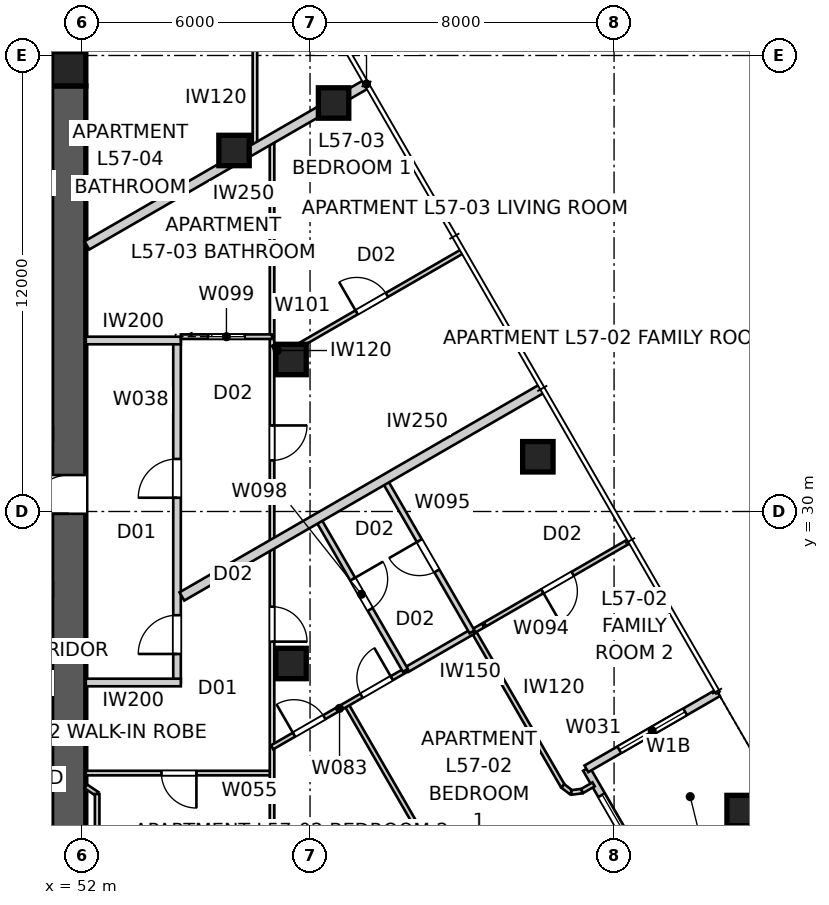
"""IFC4 building model, lengths in metres.
Left out: names, types, materials, properties, quantities, classifications, styles, units other than length and angle.
Written with IfcOpenShell. Run it as: python <this file> out.ifc"""

import sys

from ifc_helpers import new_model, si_unit, direction, frame, frame_2d, origin, origin_2d, place, context, subcontext, project, spatial, polyline, rectangle, outline, extrude, element, fill, save


model = new_model("IFC4")
c1 = context("Model", 3, precision=1e-05, world=origin(), true_north=direction((0.0, 1.0)))
c2 = subcontext(c1, "Body", "Model", "MODEL_VIEW")
j1 = project(units=[si_unit("LENGTHUNIT", "METRE"), si_unit("PLANEANGLEUNIT", "RADIAN")], contexts=[c1])
p1 = place(None, origin())
s1 = spatial("IfcSite", under=j1, at=p1, CompositionType="ELEMENT")
p2 = place(p1, origin())
s2 = spatial("IfcBuilding", under=s1, at=p2, CompositionType="ELEMENT")
p3 = place(p2, frame((0.0, 0.0, 208.2)))
s3 = spatial("IfcBuildingStorey", under=s2, at=p3, CompositionType="ELEMENT", Elevation=208.2)
p4 = place(p3, frame((28.8, 41.65, 0.0), z_axis=(0.0, 0.0, 1.0), x_axis=(1.0, 0.0, 0.0)))
e1 = element("IfcWall", 1, at=p4, inside=s3, PredefinedType="SHEAR", context=c2, shape_type="SweptSolid", body=[
    extrude(outline(polyline([(0.0, -0.45), (22.4, -0.45), (22.4, -0.025), (22.85, -0.025), (22.85, 0.025), (22.4, 0.025), (22.4, 0.45), (0.0, 0.45), (0.0, 0.025), (-0.45, 0.025), (-0.45, -0.025), (0.0, -0.025), (0.0, -0.45)])), origin(), (0.0, 0.0, 1.0), 3.4),
])
p5 = place(p3, frame((51.65, 18.8, 0.0), z_axis=(0.0, 0.0, 1.0), x_axis=(0.0, 1.0, 0.0)))
e2 = element("IfcWall", 2, at=p5, inside=s3, PredefinedType="SHEAR", context=c2, shape_type="SweptSolid", body=[
    extrude(outline(polyline([(0.0, -0.45), (22.4, -0.45), (22.4, -0.025), (22.85, -0.025), (22.85, 0.025), (22.4, 0.025), (22.4, 0.45), (0.0, 0.45), (0.0, 0.025), (-0.45, 0.025), (-0.45, -0.025), (0.0, -0.025), (0.0, -0.45)])), origin(), (0.0, 0.0, 1.0), 3.4),
])
p6 = place(p5, frame((11.14, 0.0, 0.0)))
e3 = element("IfcOpeningElement", 3, at=p6, cuts=e2, PredefinedType="OPENING", context=c2, shape_type="SweptSolid", body=[
    extrude(rectangle(XDim=1.02, YDim=2.4, at=frame_2d((0.51, 1.2))), frame((0.0, 0.46, 0.0), z_axis=(0.0, -1.0, 0.0), x_axis=(1.0, 0.0, 0.0)), (0.0, 0.0, 1.0), 0.92),
])
p7 = place(p3, frame((51.65, 41.65, 0.0), z_axis=(0.0, 0.0, 1.0), x_axis=(1.0, 0.0, 0.0)))
e4 = element("IfcColumn", 4, at=p7, inside=s3, PredefinedType="COLUMN", context=c2, shape_type="SweptSolid", body=[
    extrude(rectangle(XDim=0.9, YDim=0.9, at=origin_2d()), origin(), (0.0, 0.0, 1.0), 3.4),
])
for number, where, z_axis, x_axis in (
    (5, (69.37, 22.13, -0.15), (0.0, 0.0, 1.0), (1.0, 0.0, 0.0)),
    (6, (63.995, 31.44, -0.15), (0.0, 0.0, 1.0), (1.0, 0.0, 0.0)),
    (7, (58.62, 40.75, -0.15), (0.0, 0.0, 1.0), (1.0, 0.0, 0.0)),
):
    element("IfcColumn", number, at=place(p3, frame(where, z_axis=z_axis, x_axis=x_axis)), inside=s3, PredefinedType="COLUMN", context=c2, shape_type="SweptSolid", body=[
        extrude(rectangle(XDim=0.8, YDim=0.8, at=origin_2d()), origin(), (0.0, 0.0, 1.0), 3.55),
    ])
for number, where, z_axis, x_axis in (
    (8, (57.5, 26.0, 0.0), (0.0, 0.0, 1.0), (1.0, 0.0, 0.0)),
    (9, (57.5, 34.0, 0.0), (0.0, 0.0, 1.0), (1.0, 0.0, 0.0)),
    (10, (56.0, 39.5, 0.0), (0.0, 0.0, 1.0), (1.0, 0.0, 0.0)),
):
    element("IfcColumn", number, at=place(p3, frame(where, z_axis=z_axis, x_axis=x_axis)), inside=s3, PredefinedType="COLUMN", context=c2, shape_type="SweptSolid", body=[
        extrude(rectangle(XDim=0.8, YDim=0.8, at=origin_2d()), origin(), (0.0, 0.0, 1.0), 3.4),
    ])
p8 = place(p3, frame((67.271, 19.764, 0.0), z_axis=(0.0, 0.0, 1.0), x_axis=(-0.49999894854, 0.866026010844, 0.0)))
e11 = element("IfcWall", 11, at=p8, inside=s3, PredefinedType="SOLIDWALL", context=c2, shape_type="SweptSolid", body=[
    extrude(rectangle(XDim=4.0, YDim=0.2, at=frame_2d((2.0, 0.0))), origin(), (0.0, 0.0, 1.0), 3.25),
])
p9 = place(p8, frame((0.8, 0.0, 0.0)))
e12 = element("IfcOpeningElement", 12, at=p9, cuts=e11, PredefinedType="OPENING", context=c2, shape_type="SweptSolid", body=[
    extrude(rectangle(XDim=2.4, YDim=2.1, at=frame_2d((1.2, 1.05))), frame((0.0, 0.11, 0.0), z_axis=(0.0, -1.0, 0.0), x_axis=(1.0, 0.0, 0.0)), (0.0, 0.0, 1.0), 0.22),
])
p10 = place(p3, frame((65.271, 23.229, 0.0), z_axis=(0.0, 0.0, 1.0), x_axis=(0.866026010844, 0.49999894854, 0.0)))
e13 = element("IfcWall", 13, at=p10, inside=s3, PredefinedType="SOLIDWALL", context=c2, shape_type="SweptSolid", body=[
    extrude(rectangle(XDim=4.0, YDim=0.2, at=frame_2d((2.0, 0.0))), origin(), (0.0, 0.0, 1.0), 3.25),
])
p11 = place(p10, frame((1.0, 0.0, 0.45)))
e14 = element("IfcOpeningElement", 14, at=p11, cuts=e13, PredefinedType="OPENING", context=c2, shape_type="SweptSolid", body=[
    extrude(rectangle(XDim=2.0, YDim=1.8, at=frame_2d((1.0, 0.9))), frame((0.0, 0.11, 0.0), z_axis=(0.0, -1.0, 0.0), x_axis=(1.0, 0.0, 0.0)), (0.0, 0.0, 1.0), 0.22),
])
p12 = place(p3, frame((54.5, 25.5, 0.0), z_axis=(0.0, 0.0, 1.0), x_axis=(0.0, 1.0, 0.0)))
e15 = element("IfcWall", 15, at=p12, inside=s3, PredefinedType="PARTITIONING", context=c2, shape_type="SweptSolid", body=[
    extrude(rectangle(XDim=9.0, YDim=0.2, at=frame_2d((4.5, 0.0))), origin(), (0.0, 0.0, 1.0), 3.25),
])
p13 = place(p12, frame((4.862, 0.0, 0.0)))
e16 = element("IfcOpeningElement", 16, at=p13, cuts=e15, PredefinedType="OPENING", context=c2, shape_type="SweptSolid", body=[
    extrude(rectangle(XDim=1.02, YDim=2.34, at=frame_2d((0.51, 1.17))), frame((0.0, 0.11, 0.0), z_axis=(0.0, -1.0, 0.0), x_axis=(1.0, 0.0, 0.0)), (0.0, 0.0, 1.0), 0.22),
])
p14 = place(p12, frame((0.751, 0.0, 0.0)))
e17 = element("IfcOpeningElement", 17, at=p14, cuts=e15, PredefinedType="OPENING", context=c2, shape_type="SweptSolid", body=[
    extrude(rectangle(XDim=1.02, YDim=2.34, at=frame_2d((0.51, 1.17))), frame((0.0, 0.11, 0.0), z_axis=(0.0, -1.0, 0.0), x_axis=(1.0, 0.0, 0.0)), (0.0, 0.0, 1.0), 0.22),
])
for number, where, z_axis, x_axis in (
    (18, (52.1, 34.5, 0.0), (0.0, 0.0, 1.0), (1.0, 0.0, 0.0)),
    (19, (52.1, 25.5, 0.0), (0.0, 0.0, 1.0), (1.0, 0.0, 0.0)),
):
    element("IfcWall", number, at=place(p3, frame(where, z_axis=z_axis, x_axis=x_axis)), inside=s3, PredefinedType="PARTITIONING", context=c2, shape_type="SweptSolid", body=[
        extrude(rectangle(XDim=2.5, YDim=0.2, at=frame_2d((1.25, 0.0))), origin(), (0.0, 0.0, 1.0), 3.25),
    ])
p15 = place(p3, frame((59.486, 41.25, 0.0), z_axis=(0.0, 0.0, 1.0), x_axis=(-0.866020489494, -0.500008511703, 0.0)))
e20 = element("IfcWall", 20, at=p15, inside=s3, PredefinedType="PARTITIONING", context=c2, shape_type="SweptSolid", body=[
    extrude(rectangle(XDim=8.496, YDim=0.25, at=frame_2d((4.248, 0.0))), origin(), (0.0, 0.0, 1.0), 3.25),
])
p16 = place(p3, frame((64.111, 33.239, 0.0), z_axis=(0.0, 0.0, 1.0), x_axis=(-0.866024069551, -0.500002310952, 0.0)))
e21 = element("IfcWall", 21, at=p16, inside=s3, PredefinedType="PARTITIONING", context=c2, shape_type="SweptSolid", body=[
    extrude(rectangle(XDim=10.95, YDim=0.25, at=frame_2d((5.475, 0.0))), origin(), (0.0, 0.0, 1.0), 3.25),
])
p17 = place(p3, frame((57.0, 23.116, 0.0), z_axis=(0.0, 0.0, 1.0), x_axis=(-1.0, 0.0, 0.0)))
e22 = element("IfcWall", 22, at=p17, inside=s3, PredefinedType="PARTITIONING", context=c2, shape_type="SweptSolid", body=[
    extrude(rectangle(XDim=4.9, YDim=0.12, at=frame_2d((2.45, 0.0))), origin(), (0.0, 0.0, 1.0), 3.25),
])
p18 = place(p17, frame((1.99, 0.0, 0.0)))
e23 = element("IfcOpeningElement", 23, at=p18, cuts=e22, PredefinedType="OPENING", context=c2, shape_type="SweptSolid", body=[
    extrude(rectangle(XDim=0.92, YDim=2.34, at=frame_2d((0.46, 1.17))), frame((0.0, 0.07, 0.0), z_axis=(0.0, -1.0, 0.0), x_axis=(1.0, 0.0, 0.0)), (0.0, 0.0, 1.0), 0.14),
])
p19 = place(p3, frame((57.0, 39.815, 0.0), z_axis=(0.0, 0.0, 1.0), x_axis=(0.0, -1.0, 0.0)))
e24 = element("IfcWall", 24, at=p19, inside=s3, PredefinedType="PARTITIONING", context=c2, shape_type="SweptSolid", body=[
    extrude(rectangle(XDim=21.919, YDim=0.12, at=frame_2d((10.959, 0.0))), origin(), (0.0, 0.0, 1.0), 2.55),
])
p20 = place(p19, frame((7.551, 0.0, 0.0)))
e25 = element("IfcOpeningElement", 25, at=p20, cuts=e24, PredefinedType="OPENING", context=c2, shape_type="SweptSolid", body=[
    extrude(rectangle(XDim=0.92, YDim=2.34, at=frame_2d((0.46, 1.17))), frame((0.0, 0.07, 0.0), z_axis=(0.0, -1.0, 0.0), x_axis=(1.0, 0.0, 0.0)), (0.0, 0.0, 1.0), 0.14),
])
p21 = place(p19, frame((12.32, 0.0, 0.0)))
e26 = element("IfcOpeningElement", 26, at=p21, cuts=e24, PredefinedType="OPENING", context=c2, shape_type="SweptSolid", body=[
    extrude(rectangle(XDim=0.92, YDim=2.34, at=frame_2d((0.46, 1.17))), frame((0.0, 0.07, 0.0), z_axis=(0.0, -1.0, 0.0), x_axis=(1.0, 0.0, 0.0)), (0.0, 0.0, 1.0), 0.14),
])
p22 = place(p3, frame((52.1, 22.766, 0.0), z_axis=(0.0, 0.0, 1.0), x_axis=(0.830477359488, -0.55705238118, 0.0)))
e27 = element("IfcWall", 27, at=p22, inside=s3, PredefinedType="PARTITIONING", context=c2, shape_type="SweptSolid", body=[
    extrude(rectangle(XDim=0.359, YDim=0.12, at=frame_2d((0.179, 0.0))), origin(), (0.0, 0.0, 1.0), 3.25),
])
p23 = place(p3, frame((52.398, 22.566, 0.0), z_axis=(0.0, 0.0, 1.0), x_axis=(0.0, -1.0, 0.0)))
e28 = element("IfcWall", 28, at=p23, inside=s3, PredefinedType="PARTITIONING", context=c2, shape_type="SweptSolid", body=[
    extrude(rectangle(XDim=4.621, YDim=0.12, at=frame_2d((2.31, 0.0))), origin(), (0.0, 0.0, 1.0), 3.25),
])
p24 = place(p3, frame((63.246, 17.487, 0.0), z_axis=(0.0, 0.0, 1.0), x_axis=(-0.49999898161, 0.866025991751, 0.0)))
e29 = element("IfcWall", 29, at=p24, inside=s3, PredefinedType="PARTITIONING", context=c2, shape_type="SweptSolid", body=[
    extrude(rectangle(XDim=8.585, YDim=0.12, at=frame_2d((4.292, 0.0))), origin(), (0.0, 0.0, 1.0), 3.25),
])
p25 = place(p3, frame((57.0, 23.793, 0.0), z_axis=(0.0, 0.0, 1.0), x_axis=(0.866007146345, 0.50003162148, 0.0)))
e30 = element("IfcWall", 30, at=p25, inside=s3, PredefinedType="PARTITIONING", context=c2, shape_type="SweptSolid", body=[
    extrude(rectangle(XDim=4.101, YDim=0.12, at=frame_2d((2.051, 0.0))), origin(), (0.0, 0.0, 1.0), 3.25),
])
p26 = place(p25, frame((0.668, 0.0, 0.0)))
e31 = element("IfcOpeningElement", 31, at=p26, cuts=e30, PredefinedType="OPENING", context=c2, shape_type="SweptSolid", body=[
    extrude(rectangle(XDim=0.92, YDim=2.34, at=frame_2d((0.46, 1.17))), frame((0.0, 0.07, 0.0), z_axis=(0.0, -1.0, 0.0), x_axis=(1.0, 0.0, 0.0)), (0.0, 0.0, 1.0), 0.14),
])
p27 = place(p25, frame((2.719, 0.0, 0.0)))
e32 = element("IfcOpeningElement", 32, at=p27, cuts=e30, PredefinedType="OPENING", context=c2, shape_type="SweptSolid", body=[
    extrude(rectangle(XDim=0.92, YDim=2.34, at=frame_2d((0.46, 1.17))), frame((0.0, 0.07, 0.0), z_axis=(0.0, -1.0, 0.0), x_axis=(1.0, 0.0, 0.0)), (0.0, 0.0, 1.0), 0.14),
])
p28 = place(p3, frame((62.299, 26.853, 0.0), z_axis=(0.0, 0.0, 1.0), x_axis=(0.500006955494, -0.866021387991, 0.0)))
e33 = element("IfcWall", 33, at=p28, inside=s3, PredefinedType="PARTITIONING", context=c2, shape_type="SweptSolid", body=[
    extrude(rectangle(XDim=4.705, YDim=0.12, at=frame_2d((2.352, 0.0))), origin(), (0.0, 0.0, 1.0), 3.25),
])
p29 = place(p3, frame((64.651, 22.778, 0.0), z_axis=(0.0, 0.0, 1.0), x_axis=(0.793231928283, -0.608919623557, 0.0)))
e34 = element("IfcWall", 34, at=p29, inside=s3, PredefinedType="PARTITIONING", context=c2, shape_type="SweptSolid", body=[
    extrude(rectangle(XDim=0.283, YDim=0.12, at=frame_2d((0.142, 0.0))), origin(), (0.0, 0.0, 1.0), 3.25),
])
p30 = place(p3, frame((64.876, 22.606, 0.0), z_axis=(0.0, 0.0, 1.0), x_axis=(0.991407364485, 0.130810693925, 0.0)))
e35 = element("IfcWall", 35, at=p30, inside=s3, PredefinedType="PARTITIONING", context=c2, shape_type="SweptSolid", body=[
    extrude(rectangle(XDim=0.284, YDim=0.12, at=frame_2d((0.142, 0.0))), origin(), (0.0, 0.0, 1.0), 3.25),
])
p31 = place(p3, frame((65.157, 22.643, 0.0), z_axis=(0.0, 0.0, 1.0), x_axis=(0.866058575552, 0.499942540411, 0.0)))
e36 = element("IfcWall", 36, at=p31, inside=s3, PredefinedType="PARTITIONING", context=c2, shape_type="SweptSolid", body=[
    extrude(rectangle(XDim=0.352, YDim=0.12, at=frame_2d((0.176, 0.0))), origin(), (0.0, 0.0, 1.0), 3.25),
])
p32 = place(p3, frame((60.552, 25.844, 0.0), z_axis=(0.0, 0.0, 1.0), x_axis=(0.866074730264, 0.499914554297, 0.0)))
e37 = element("IfcWall", 37, at=p32, inside=s3, PredefinedType="SOLIDWALL", context=c2, shape_type="SweptSolid", body=[
    extrude(rectangle(XDim=2.017, YDim=0.15, at=frame_2d((1.008, 0.0))), origin(), (0.0, 0.0, 1.0), 3.25),
])
p33 = place(p3, frame((62.555, 27.0, 0.0), z_axis=(0.0, 0.0, 1.0), x_axis=(-0.865896854829, -0.500222587251, 0.0)))
e38 = element("IfcWall", 38, at=p33, inside=s3, PredefinedType="PARTITIONING", context=c2, shape_type="SweptSolid", body=[
    extrude(rectangle(XDim=0.296, YDim=0.12, at=frame_2d((0.148, 0.0))), origin(), (0.0, 0.0, 1.0), 3.25),
])
p34 = place(p3, frame((66.388, 29.214, 0.0), z_axis=(0.0, 0.0, 1.0), x_axis=(-0.866032173762, -0.499988273872, 0.0)))
e39 = element("IfcWall", 39, at=p34, inside=s3, PredefinedType="PARTITIONING", context=c2, shape_type="SweptSolid", body=[
    extrude(rectangle(XDim=4.373, YDim=0.12, at=frame_2d((2.186, 0.0))), origin(), (0.0, 0.0, 1.0), 3.25),
])
p35 = place(p34, frame((1.706, 0.0, 0.0)))
e40 = element("IfcOpeningElement", 40, at=p35, cuts=e39, PredefinedType="OPENING", context=c2, shape_type="SweptSolid", body=[
    extrude(rectangle(XDim=0.92, YDim=2.34, at=frame_2d((0.46, 1.17))), frame((0.0, 0.07, 0.0), z_axis=(0.0, -1.0, 0.0), x_axis=(1.0, 0.0, 0.0)), (0.0, 0.0, 1.0), 0.14),
])
p36 = place(p3, frame((62.263, 26.832, 0.0), z_axis=(0.0, 0.0, 1.0), x_axis=(-0.499999662836, 0.866025598446, 0.0)))
e41 = element("IfcWall", 41, at=p36, inside=s3, PredefinedType="SOLIDWALL", context=c2, shape_type="SweptSolid", body=[
    extrude(rectangle(XDim=4.625, YDim=0.15, at=frame_2d((2.312, 0.0))), origin(), (0.0, 0.0, 1.0), 3.25),
])
p37 = place(p36, frame((1.853, 0.0, 0.0)))
e42 = element("IfcOpeningElement", 42, at=p37, cuts=e41, PredefinedType="OPENING", context=c2, shape_type="SweptSolid", body=[
    extrude(rectangle(XDim=0.92, YDim=2.34, at=frame_2d((0.46, 1.17))), frame((0.0, 0.085, 0.0), z_axis=(0.0, -1.0, 0.0), x_axis=(1.0, 0.0, 0.0)), (0.0, 0.0, 1.0), 0.17),
])
p38 = place(p3, frame((58.196, 29.824, 0.0), z_axis=(0.0, 0.0, 1.0), x_axis=(0.499999662836, -0.866025598446, 0.0)))
e43 = element("IfcWall", 43, at=p38, inside=s3, PredefinedType="SOLIDWALL", context=c2, shape_type="SweptSolid", body=[
    extrude(rectangle(XDim=4.625, YDim=0.15, at=frame_2d((2.312, 0.0))), origin(), (0.0, 0.0, 1.0), 3.25),
])
p39 = place(p38, frame((1.853, 0.0, 0.0)))
e44 = element("IfcOpeningElement", 44, at=p39, cuts=e43, PredefinedType="OPENING", context=c2, shape_type="SweptSolid", body=[
    extrude(rectangle(XDim=0.92, YDim=2.34, at=frame_2d((0.46, 1.17))), frame((0.0, 0.085, 0.0), z_axis=(0.0, -1.0, 0.0), x_axis=(1.0, 0.0, 0.0)), (0.0, 0.0, 1.0), 0.17),
])
p40 = place(p3, frame((54.6, 34.6, 0.0), z_axis=(0.0, 0.0, 1.0), x_axis=(1.0, 0.0, 0.0)))
e45 = element("IfcWall", 45, at=p40, inside=s3, PredefinedType="PARTITIONING", context=c2, shape_type="SweptSolid", body=[
    extrude(rectangle(XDim=2.4, YDim=0.12, at=frame_2d((1.2, 0.0))), origin(), (0.0, 0.0, 1.0), 3.25),
])
p41 = place(p40, frame((0.72, 0.0, 0.0)))
e46 = element("IfcOpeningElement", 46, at=p41, cuts=e45, PredefinedType="OPENING", context=c2, shape_type="SweptSolid", body=[
    extrude(rectangle(XDim=0.96, YDim=2.1, at=frame_2d((0.48, 1.05))), frame((0.0, 0.07, 0.0), z_axis=(0.0, -1.0, 0.0), x_axis=(1.0, 0.0, 0.0)), (0.0, 0.0, 1.0), 0.14),
])
p42 = place(p3, frame((57.05, 34.388, 0.0), z_axis=(0.0, 0.0, 1.0), x_axis=(0.49996389635, -0.866046247233, 0.0)))
e47 = element("IfcWall", 47, at=p42, inside=s3, PredefinedType="PARTITIONING", context=c2, shape_type="SweptSolid", body=[
    extrude(rectangle(XDim=0.35, YDim=0.12, at=frame_2d((0.175, 0.0))), origin(), (0.0, 0.0, 1.0), 3.25),
])
p43 = place(p3, frame((57.225, 34.085, 0.0), z_axis=(0.0, 0.0, 1.0), x_axis=(0.866019274569, 0.500010615962, 0.0)))
e48 = element("IfcWall", 48, at=p43, inside=s3, PredefinedType="PARTITIONING", context=c2, shape_type="SweptSolid", body=[
    extrude(rectangle(XDim=5.5, YDim=0.12, at=frame_2d((2.75, 0.0))), origin(), (0.0, 0.0, 1.0), 3.25),
])
p44 = place(p43, frame((2.31, 0.0, 0.0)))
e49 = element("IfcOpeningElement", 49, at=p44, cuts=e48, PredefinedType="OPENING", context=c2, shape_type="SweptSolid", body=[
    extrude(rectangle(XDim=0.92, YDim=2.34, at=frame_2d((0.46, 1.17))), frame((0.0, 0.07, 0.0), z_axis=(0.0, -1.0, 0.0), x_axis=(1.0, 0.0, 0.0)), (0.0, 0.0, 1.0), 0.14),
])
p45 = place(p3, frame((56.55, 42.226, 0.0), z_axis=(0.0, 0.0, 1.0), x_axis=(0.0, -1.0, 0.0)))
e50 = element("IfcWall", 50, at=p45, inside=s3, PredefinedType="PARTITIONING", context=c2, shape_type="SweptSolid", body=[
    extrude(rectangle(XDim=2.671, YDim=0.12, at=frame_2d((1.335, 0.0))), origin(), (0.0, 0.0, 1.0), 3.25),
])
p46 = place(p9, origin())
e51 = element("IfcDoor", 51, at=p46, inside=s3, OperationType="SLIDING_TO_LEFT", PredefinedType="DOOR", context=c2, shape_type="SweptSolid", body=[
    extrude(rectangle(XDim=2.4, YDim=2.1, at=frame_2d((1.2, 1.05))), frame((0.0, 0.025, 0.0), z_axis=(0.0, -1.0, 0.0), x_axis=(1.0, 0.0, 0.0)), (0.0, 0.0, 1.0), 0.05),
])
fill(e12, e51)
p47 = place(p11, origin())
e52 = element("IfcWindow", 52, at=p47, inside=s3, PartitioningType="SINGLE_PANEL", PredefinedType="WINDOW", context=c2, shape_type="SweptSolid", body=[
    extrude(rectangle(XDim=2.0, YDim=1.8, at=frame_2d((1.0, 0.9))), frame((0.0, 0.03, 0.0), z_axis=(0.0, -1.0, 0.0), x_axis=(1.0, 0.0, 0.0)), (0.0, 0.0, 1.0), 0.06),
])
fill(e14, e52)
p48 = place(p13, origin())
e53 = element("IfcDoor", 53, at=p48, inside=s3, OperationType="SINGLE_SWING_LEFT", PredefinedType="DOOR", context=c2, shape_type="SweptSolid", body=[
    extrude(rectangle(XDim=1.02, YDim=2.34, at=frame_2d((0.51, 1.17))), frame((0.0, 0.025, 0.0), z_axis=(0.0, -1.0, 0.0), x_axis=(1.0, 0.0, 0.0)), (0.0, 0.0, 1.0), 0.05),
])
fill(e16, e53)
p49 = place(p14, origin())
e54 = element("IfcDoor", 54, at=p49, inside=s3, OperationType="SINGLE_SWING_LEFT", PredefinedType="DOOR", context=c2, shape_type="SweptSolid", body=[
    extrude(rectangle(XDim=1.02, YDim=2.34, at=frame_2d((0.51, 1.17))), frame((0.0, 0.025, 0.0), z_axis=(0.0, -1.0, 0.0), x_axis=(1.0, 0.0, 0.0)), (0.0, 0.0, 1.0), 0.05),
])
fill(e17, e54)
p50 = place(p20, origin())
e55 = element("IfcDoor", 55, at=p50, inside=s3, OperationType="SINGLE_SWING_LEFT", PredefinedType="DOOR", context=c2, shape_type="SweptSolid", body=[
    extrude(rectangle(XDim=0.92, YDim=2.34, at=frame_2d((0.46, 1.17))), frame((0.0, 0.025, 0.0), z_axis=(0.0, -1.0, 0.0), x_axis=(1.0, 0.0, 0.0)), (0.0, 0.0, 1.0), 0.05),
])
fill(e25, e55)
p51 = place(p41, origin())
e56 = element("IfcDoor", 56, at=p51, inside=s3, OperationType="SLIDING_TO_LEFT", PredefinedType="DOOR", context=c2, shape_type="SweptSolid", body=[
    extrude(rectangle(XDim=0.96, YDim=2.1, at=frame_2d((0.48, 1.05))), frame((0.0, 0.025, 0.0), z_axis=(0.0, -1.0, 0.0), x_axis=(1.0, 0.0, 0.0)), (0.0, 0.0, 1.0), 0.05),
])
fill(e46, e56)
p52 = place(p21, origin())
e57 = element("IfcDoor", 57, at=p52, inside=s3, OperationType="SINGLE_SWING_RIGHT", PredefinedType="DOOR", context=c2, shape_type="SweptSolid", body=[
    extrude(rectangle(XDim=0.92, YDim=2.34, at=frame_2d((0.46, 1.17))), frame((0.0, 0.025, 0.0), z_axis=(0.0, -1.0, 0.0), x_axis=(1.0, 0.0, 0.0)), (0.0, 0.0, 1.0), 0.05),
])
fill(e26, e57)
p53 = place(p18, origin())
e58 = element("IfcDoor", 58, at=p53, inside=s3, OperationType="SINGLE_SWING_LEFT", PredefinedType="DOOR", context=c2, shape_type="SweptSolid", body=[
    extrude(rectangle(XDim=0.92, YDim=2.34, at=frame_2d((0.46, 1.17))), frame((0.0, 0.025, 0.0), z_axis=(0.0, -1.0, 0.0), x_axis=(1.0, 0.0, 0.0)), (0.0, 0.0, 1.0), 0.05),
])
fill(e23, e58)
p54 = place(p44, origin())
e59 = element("IfcDoor", 59, at=p54, inside=s3, OperationType="SINGLE_SWING_LEFT", PredefinedType="DOOR", context=c2, shape_type="SweptSolid", body=[
    extrude(rectangle(XDim=0.92, YDim=2.34, at=frame_2d((0.46, 1.17))), frame((0.0, 0.025, 0.0), z_axis=(0.0, -1.0, 0.0), x_axis=(1.0, 0.0, 0.0)), (0.0, 0.0, 1.0), 0.05),
])
fill(e49, e59)
p55 = place(p39, origin())
e60 = element("IfcDoor", 60, at=p55, inside=s3, OperationType="SINGLE_SWING_LEFT", PredefinedType="DOOR", context=c2, shape_type="SweptSolid", body=[
    extrude(rectangle(XDim=0.92, YDim=2.34, at=frame_2d((0.46, 1.17))), frame((0.0, 0.025, 0.0), z_axis=(0.0, -1.0, 0.0), x_axis=(1.0, 0.0, 0.0)), (0.0, 0.0, 1.0), 0.05),
])
fill(e44, e60)
p56 = place(p26, origin())
e61 = element("IfcDoor", 61, at=p56, inside=s3, OperationType="SINGLE_SWING_LEFT", PredefinedType="DOOR", context=c2, shape_type="SweptSolid", body=[
    extrude(rectangle(XDim=0.92, YDim=2.34, at=frame_2d((0.46, 1.17))), frame((0.0, 0.025, 0.0), z_axis=(0.0, -1.0, 0.0), x_axis=(1.0, 0.0, 0.0)), (0.0, 0.0, 1.0), 0.05),
])
fill(e31, e61)
p57 = place(p27, origin())
e62 = element("IfcDoor", 62, at=p57, inside=s3, OperationType="SINGLE_SWING_RIGHT", PredefinedType="DOOR", context=c2, shape_type="SweptSolid", body=[
    extrude(rectangle(XDim=0.92, YDim=2.34, at=frame_2d((0.46, 1.17))), frame((0.0, 0.025, 0.0), z_axis=(0.0, -1.0, 0.0), x_axis=(1.0, 0.0, 0.0)), (0.0, 0.0, 1.0), 0.05),
])
fill(e32, e62)
p58 = place(p37, origin())
e63 = element("IfcDoor", 63, at=p58, inside=s3, OperationType="SINGLE_SWING_RIGHT", PredefinedType="DOOR", context=c2, shape_type="SweptSolid", body=[
    extrude(rectangle(XDim=0.92, YDim=2.34, at=frame_2d((0.46, 1.17))), frame((0.0, 0.025, 0.0), z_axis=(0.0, -1.0, 0.0), x_axis=(1.0, 0.0, 0.0)), (0.0, 0.0, 1.0), 0.05),
])
fill(e42, e63)
p59 = place(p35, origin())
e64 = element("IfcDoor", 64, at=p59, inside=s3, OperationType="SINGLE_SWING_RIGHT", PredefinedType="DOOR", context=c2, shape_type="SweptSolid", body=[
    extrude(rectangle(XDim=0.92, YDim=2.34, at=frame_2d((0.46, 1.17))), frame((0.0, 0.025, 0.0), z_axis=(0.0, -1.0, 0.0), x_axis=(1.0, 0.0, 0.0)), (0.0, 0.0, 1.0), 0.05),
])
fill(e40, e64)
p60 = place(p6, origin())
e65 = element("IfcDoor", 65, at=p60, inside=s3, OperationType="SINGLE_SWING_LEFT", PredefinedType="DOOR", context=c2, shape_type="SweptSolid", body=[
    extrude(rectangle(XDim=1.02, YDim=2.4, at=frame_2d((0.51, 1.2))), frame((0.0, 0.025, 0.0), z_axis=(0.0, -1.0, 0.0), x_axis=(1.0, 0.0, 0.0)), (0.0, 0.0, 1.0), 0.05),
])
fill(e3, e65)
save(model, sys.argv[1])
